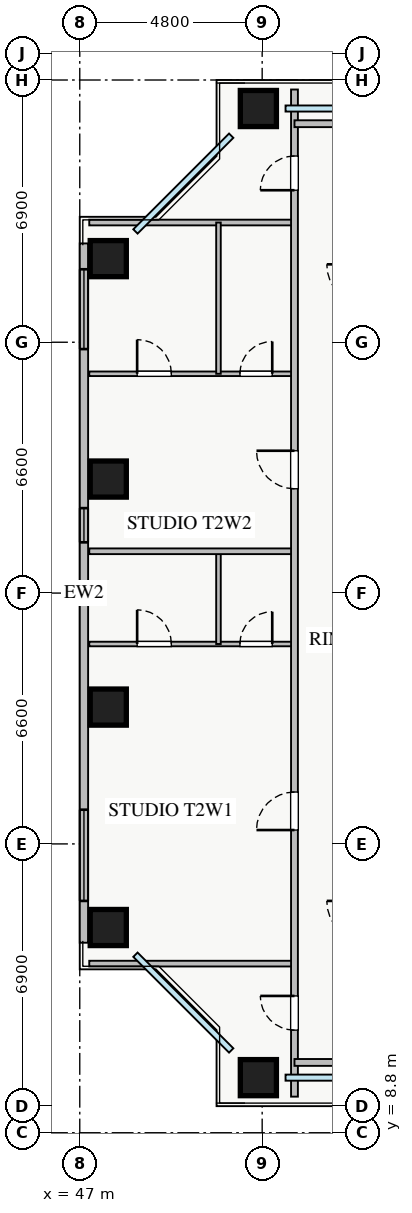
"""IFC4 building model, lengths in metres.
Left out: names, types, materials, properties, quantities, classifications, styles, units other than length and angle.
Written with IfcOpenShell. Run it as: python <this file> out.ifc"""

import sys

from ifc_helpers import new_model, si_unit, direction, frame, frame_2d, origin, origin_2d, place, context, subcontext, project, spatial, rectangle, extrude, source, transform, mapped, element, fill, save


model = new_model("IFC4")
c1 = context("Model", 3, precision=1e-05, world=origin(), true_north=direction((0.0, 1.0)))
c2 = subcontext(c1, "Body", "Model", "MODEL_VIEW")
j1 = project(units=[si_unit("LENGTHUNIT", "METRE"), si_unit("PLANEANGLEUNIT", "RADIAN")], contexts=[c1])
p1 = place(None, origin())
s1 = spatial("IfcSite", under=j1, at=p1, CompositionType="ELEMENT")
p2 = place(p1, origin())
s2 = spatial("IfcBuilding", under=s1, at=p2, CompositionType="ELEMENT")
p3 = place(p2, frame((0.0, 0.0, 39.25)))
s3 = spatial("IfcBuildingStorey", under=s2, at=p3, CompositionType="ELEMENT", Elevation=39.25)
m1 = source(origin(), c2, "Body", "SweptSolid", [
    extrude(rectangle(XDim=0.95, YDim=0.95, at=origin_2d()), origin(), (0.0, 0.0, 1.0), 3.25),
])
for number, where, z_axis, x_axis in (
    (1, (51.7, 10.25, 0.0), (0.0, 0.0, 1.0), (1.0, 0.0, 0.0)),
    (2, (51.7, 35.75, 0.0), (0.0, 0.0, 1.0), (1.0, 0.0, 0.0)),
    (3, (47.75, 14.2, 0.0), (0.0, 0.0, 1.0), (1.0, 0.0, 0.0)),
    (4, (47.75, 20.0, 0.0), (0.0, 0.0, 1.0), (1.0, 0.0, 0.0)),
    (5, (47.75, 26.0, 0.0), (0.0, 0.0, 1.0), (1.0, 0.0, 0.0)),
    (6, (47.75, 31.8, 0.0), (0.0, 0.0, 1.0), (1.0, 0.0, 0.0)),
):
    element("IfcColumn", number, at=place(p3, frame(where, z_axis=z_axis, x_axis=x_axis)), inside=s3, PredefinedType="COLUMN", context=c2, shape_type="MappedRepresentation", body=[
        mapped(m1, transform((0.0, 0.0, 0.0), x_axis=(1.0, 0.0, 0.0), y_axis=(0.0, 1.0, 0.0), z_axis=(0.0, 0.0, 1.0), scale=1.0)),
    ])
p4 = place(p3, frame((47.11, 13.8, 0.0), z_axis=(0.0, 0.0, 1.0), x_axis=(0.0, 1.0, 0.0)))
e7 = element("IfcWall", 7, at=p4, inside=s3, PredefinedType="STANDARD", context=c2, shape_type="SweptSolid", body=[
    extrude(rectangle(XDim=18.4, YDim=0.22, at=frame_2d((9.2, 0.0))), origin(), (0.0, 0.0, 1.0), 2.61),
])
p5 = place(p4, frame((1.1, 0.0, 0.9)))
e8 = element("IfcOpeningElement", 8, at=p5, cuts=e7, PredefinedType="OPENING", context=c2, shape_type="SweptSolid", body=[
    extrude(rectangle(XDim=2.4, YDim=1.48, at=frame_2d((1.2, 0.74))), frame((0.0, 0.12, 0.0), z_axis=(0.0, -1.0, 0.0), x_axis=(1.0, 0.0, 0.0)), (0.0, 0.0, 1.0), 0.24),
])
p6 = place(p4, frame((15.62, 0.0, 0.9)))
e9 = element("IfcOpeningElement", 9, at=p6, cuts=e7, PredefinedType="OPENING", context=c2, shape_type="SweptSolid", body=[
    extrude(rectangle(XDim=2.1, YDim=1.5, at=frame_2d((1.05, 0.75))), frame((0.0, 0.12, 0.0), z_axis=(0.0, -1.0, 0.0), x_axis=(1.0, 0.0, 0.0)), (0.0, 0.0, 1.0), 0.24),
])
p7 = place(p4, frame((10.535, 0.0, 0.9)))
e10 = element("IfcOpeningElement", 10, at=p7, cuts=e7, PredefinedType="OPENING", context=c2, shape_type="SweptSolid", body=[
    extrude(rectangle(XDim=0.9, YDim=1.2, at=frame_2d((0.45, 0.6))), frame((0.0, 0.12, 0.0), z_axis=(0.0, -1.0, 0.0), x_axis=(1.0, 0.0, 0.0)), (0.0, 0.0, 1.0), 0.24),
])
for number, where, z_axis, x_axis in (
    (11, (47.25, 32.75, 0.0), (0.0, 0.0, 1.0), (1.0, 0.0, 0.0)),
    (12, (47.25, 13.25, 0.0), (0.0, 0.0, 1.0), (1.0, 0.0, 0.0)),
):
    element("IfcWall", number, at=place(p3, frame(where, z_axis=z_axis, x_axis=x_axis)), inside=s3, PredefinedType="PARTITIONING", context=c2, shape_type="SweptSolid", body=[
        extrude(rectangle(XDim=5.4, YDim=0.15, at=frame_2d((2.7, 0.0))), origin(), (0.0, 0.0, 1.0), 3.07),
    ])
p8 = place(p3, frame((47.25, 21.66, 0.0), z_axis=(0.0, 0.0, 1.0), x_axis=(1.0, 0.0, 0.0)))
e13 = element("IfcWall", 13, at=p8, inside=s3, PredefinedType="PLUMBINGWALL", context=c2, shape_type="SweptSolid", body=[
    extrude(rectangle(XDim=5.4, YDim=0.12, at=frame_2d((2.7, 0.0))), origin(), (0.0, 0.0, 1.0), 3.07),
])
p9 = place(p8, frame((1.26, 0.0, 0.0)))
e14 = element("IfcOpeningElement", 14, at=p9, cuts=e13, PredefinedType="OPENING", context=c2, shape_type="SweptSolid", body=[
    extrude(rectangle(XDim=0.9, YDim=2.05, at=frame_2d((0.45, 1.025))), frame((0.0, 0.07, 0.0), z_axis=(0.0, -1.0, 0.0), x_axis=(1.0, 0.0, 0.0)), (0.0, 0.0, 1.0), 0.14),
])
p10 = place(p8, frame((3.965, 0.0, 0.0)))
e15 = element("IfcOpeningElement", 15, at=p10, cuts=e13, PredefinedType="OPENING", context=c2, shape_type="SweptSolid", body=[
    extrude(rectangle(XDim=0.85, YDim=2.05, at=frame_2d((0.425, 1.025))), frame((0.0, 0.07, 0.0), z_axis=(0.0, -1.0, 0.0), x_axis=(1.0, 0.0, 0.0)), (0.0, 0.0, 1.0), 0.14),
])
p11 = place(p3, frame((50.65, 21.66, 0.0), z_axis=(0.0, 0.0, 1.0), x_axis=(0.0, 1.0, 0.0)))
e16 = element("IfcWall", 16, at=p11, inside=s3, PredefinedType="PLUMBINGWALL", context=c2, shape_type="SweptSolid", body=[
    extrude(rectangle(XDim=2.44, YDim=0.12, at=frame_2d((1.22, 0.0))), origin(), (0.0, 0.0, 1.0), 3.07),
])
p12 = place(p3, frame((47.25, 28.77, 0.0), z_axis=(0.0, 0.0, 1.0), x_axis=(1.0, 0.0, 0.0)))
e17 = element("IfcWall", 17, at=p12, inside=s3, PredefinedType="PLUMBINGWALL", context=c2, shape_type="SweptSolid", body=[
    extrude(rectangle(XDim=5.4, YDim=0.12, at=frame_2d((2.7, 0.0))), origin(), (0.0, 0.0, 1.0), 3.07),
])
p13 = place(p12, frame((1.26, 0.0, 0.0)))
e18 = element("IfcOpeningElement", 18, at=p13, cuts=e17, PredefinedType="OPENING", context=c2, shape_type="SweptSolid", body=[
    extrude(rectangle(XDim=0.9, YDim=2.05, at=frame_2d((0.45, 1.025))), frame((0.0, 0.07, 0.0), z_axis=(0.0, -1.0, 0.0), x_axis=(1.0, 0.0, 0.0)), (0.0, 0.0, 1.0), 0.14),
])
p14 = place(p12, frame((3.965, 0.0, 0.0)))
e19 = element("IfcOpeningElement", 19, at=p14, cuts=e17, PredefinedType="OPENING", context=c2, shape_type="SweptSolid", body=[
    extrude(rectangle(XDim=0.85, YDim=2.05, at=frame_2d((0.425, 1.025))), frame((0.0, 0.07, 0.0), z_axis=(0.0, -1.0, 0.0), x_axis=(1.0, 0.0, 0.0)), (0.0, 0.0, 1.0), 0.14),
])
p15 = place(p3, frame((50.65, 28.77, 0.0), z_axis=(0.0, 0.0, 1.0), x_axis=(0.0, 1.0, 0.0)))
e20 = element("IfcWall", 20, at=p15, inside=s3, PredefinedType="PLUMBINGWALL", context=c2, shape_type="SweptSolid", body=[
    extrude(rectangle(XDim=3.98, YDim=0.12, at=frame_2d((1.99, 0.0))), origin(), (0.0, 0.0, 1.0), 3.07),
])
p16 = place(p3, frame((47.25, 24.1, 0.0), z_axis=(0.0, 0.0, 1.0), x_axis=(1.0, 0.0, 0.0)))
e21 = element("IfcWall", 21, at=p16, inside=s3, PredefinedType="PARTITIONING", context=c2, shape_type="SweptSolid", body=[
    extrude(rectangle(XDim=5.4, YDim=0.15, at=frame_2d((2.7, 0.0))), origin(), (0.0, 0.0, 1.0), 3.07),
])
p17 = place(p3, frame((52.65, 9.75, 0.0), z_axis=(0.0, 0.0, 1.0), x_axis=(0.0, 1.0, 0.0)))
e22 = element("IfcWall", 22, at=p17, inside=s3, PredefinedType="PARTITIONING", context=c2, shape_type="SweptSolid", body=[
    extrude(rectangle(XDim=26.5, YDim=0.18, at=frame_2d((13.25, 0.0))), origin(), (0.0, 0.0, 1.0), 3.07),
])
p18 = place(p17, frame((23.85, 0.0, 0.0)))
e23 = element("IfcOpeningElement", 23, at=p18, cuts=e22, PredefinedType="OPENING", context=c2, shape_type="SweptSolid", body=[
    extrude(rectangle(XDim=0.9, YDim=2.05, at=frame_2d((0.45, 1.025))), frame((0.0, 0.1, 0.0), z_axis=(0.0, -1.0, 0.0), x_axis=(1.0, 0.0, 0.0)), (0.0, 0.0, 1.0), 0.2),
])
p19 = place(p17, frame((1.75, 0.0, 0.0)))
e24 = element("IfcOpeningElement", 24, at=p19, cuts=e22, PredefinedType="OPENING", context=c2, shape_type="SweptSolid", body=[
    extrude(rectangle(XDim=0.9, YDim=2.05, at=frame_2d((0.45, 1.025))), frame((0.0, 0.1, 0.0), z_axis=(0.0, -1.0, 0.0), x_axis=(1.0, 0.0, 0.0)), (0.0, 0.0, 1.0), 0.2),
])
p20 = place(p17, frame((7.015, 0.0, 0.0)))
e25 = element("IfcOpeningElement", 25, at=p20, cuts=e22, PredefinedType="OPENING", context=c2, shape_type="SweptSolid", body=[
    extrude(rectangle(XDim=1.0, YDim=2.05, at=frame_2d((0.5, 1.025))), frame((0.0, 0.1, 0.0), z_axis=(0.0, -1.0, 0.0), x_axis=(1.0, 0.0, 0.0)), (0.0, 0.0, 1.0), 0.2),
])
p21 = place(p17, frame((15.995, 0.0, 0.0)))
e26 = element("IfcOpeningElement", 26, at=p21, cuts=e22, PredefinedType="OPENING", context=c2, shape_type="SweptSolid", body=[
    extrude(rectangle(XDim=1.0, YDim=2.05, at=frame_2d((0.5, 1.025))), frame((0.0, 0.1, 0.0), z_axis=(0.0, -1.0, 0.0), x_axis=(1.0, 0.0, 0.0)), (0.0, 0.0, 1.0), 0.2),
])
p22 = place(p3, frame((52.65, 35.35, 0.0), z_axis=(0.0, 0.0, 1.0), x_axis=(1.0, 0.0, 0.0)))
e27 = element("IfcWall", 27, at=p22, inside=s3, PredefinedType="PARTITIONING", context=c2, shape_type="SweptSolid", body=[
    extrude(rectangle(XDim=17.0, YDim=0.18, at=frame_2d((8.5, 0.0))), origin(), (0.0, 0.0, 1.0), 3.07),
])
p23 = place(p22, frame((3.825, 0.0, 0.0)))
e28 = element("IfcOpeningElement", 28, at=p23, cuts=e27, PredefinedType="OPENING", context=c2, shape_type="SweptSolid", body=[
    extrude(rectangle(XDim=0.9, YDim=2.05, at=frame_2d((0.45, 1.025))), frame((0.0, 0.1, 0.0), z_axis=(0.0, -1.0, 0.0), x_axis=(1.0, 0.0, 0.0)), (0.0, 0.0, 1.0), 0.2),
])
p24 = place(p22, frame((12.325, 0.0, 0.0)))
e29 = element("IfcOpeningElement", 29, at=p24, cuts=e27, PredefinedType="OPENING", context=c2, shape_type="SweptSolid", body=[
    extrude(rectangle(XDim=0.9, YDim=2.05, at=frame_2d((0.45, 1.025))), frame((0.0, 0.1, 0.0), z_axis=(0.0, -1.0, 0.0), x_axis=(1.0, 0.0, 0.0)), (0.0, 0.0, 1.0), 0.2),
])
p25 = place(p3, frame((52.65, 10.65, 0.0), z_axis=(0.0, 0.0, 1.0), x_axis=(1.0, 0.0, 0.0)))
e30 = element("IfcWall", 30, at=p25, inside=s3, PredefinedType="PARTITIONING", context=c2, shape_type="SweptSolid", body=[
    extrude(rectangle(XDim=17.0, YDim=0.18, at=frame_2d((8.5, 0.0))), origin(), (0.0, 0.0, 1.0), 3.07),
])
p26 = place(p25, frame((4.375, 0.0, 0.0)))
e31 = element("IfcOpeningElement", 31, at=p26, cuts=e30, PredefinedType="OPENING", context=c2, shape_type="SweptSolid", body=[
    extrude(rectangle(XDim=0.9, YDim=2.05, at=frame_2d((0.45, 1.025))), frame((0.0, 0.1, 0.0), z_axis=(0.0, -1.0, 0.0), x_axis=(1.0, 0.0, 0.0)), (0.0, 0.0, 1.0), 0.2),
])
p27 = place(p25, frame((12.875, 0.0, 0.0)))
e32 = element("IfcOpeningElement", 32, at=p27, cuts=e30, PredefinedType="OPENING", context=c2, shape_type="SweptSolid", body=[
    extrude(rectangle(XDim=0.9, YDim=2.05, at=frame_2d((0.45, 1.025))), frame((0.0, 0.1, 0.0), z_axis=(0.0, -1.0, 0.0), x_axis=(1.0, 0.0, 0.0)), (0.0, 0.0, 1.0), 0.2),
])
m2 = source(origin(), c2, "Body", "SweptSolid", [
    extrude(rectangle(XDim=2.4, YDim=1.48, at=frame_2d((1.2, 0.74))), frame((0.0, 0.03, 0.0), z_axis=(0.0, -1.0, 0.0), x_axis=(1.0, 0.0, 0.0)), (0.0, 0.0, 1.0), 0.06),
])
p28 = place(p5, origin())
e33 = element("IfcWindow", 33, at=p28, inside=s3, PartitioningType="TRIPLE_PANEL_VERTICAL", PredefinedType="WINDOW", context=c2, shape_type="MappedRepresentation", body=[
    mapped(m2, transform((0.0, 0.0, 0.0), x_axis=(1.0, 0.0, 0.0), y_axis=(0.0, 1.0, 0.0), z_axis=(0.0, 0.0, 1.0), scale=1.0)),
])
fill(e8, e33)
m3 = source(origin(), c2, "Body", "SweptSolid", [
    extrude(rectangle(XDim=2.1, YDim=1.5, at=frame_2d((1.05, 0.75))), frame((0.0, 0.03, 0.0), z_axis=(0.0, -1.0, 0.0), x_axis=(1.0, 0.0, 0.0)), (0.0, 0.0, 1.0), 0.06),
])
p29 = place(p6, origin())
e34 = element("IfcWindow", 34, at=p29, inside=s3, PartitioningType="TRIPLE_PANEL_VERTICAL", PredefinedType="WINDOW", context=c2, shape_type="MappedRepresentation", body=[
    mapped(m3, transform((0.0, 0.0, 0.0), x_axis=(1.0, 0.0, 0.0), y_axis=(0.0, 1.0, 0.0), z_axis=(0.0, 0.0, 1.0), scale=1.0)),
])
fill(e9, e34)
m4 = source(origin(), c2, "Body", "SweptSolid", [
    extrude(rectangle(XDim=0.9, YDim=2.05, at=frame_2d((0.45, 1.025))), frame((0.0, 0.025, 0.0), z_axis=(0.0, -1.0, 0.0), x_axis=(1.0, 0.0, 0.0)), (0.0, 0.0, 1.0), 0.05),
])
p30 = place(p9, origin())
e35 = element("IfcDoor", 35, at=p30, inside=s3, OperationType="SINGLE_SWING_LEFT", PredefinedType="DOOR", context=c2, shape_type="MappedRepresentation", body=[
    mapped(m4, transform((0.0, 0.0, 0.0), x_axis=(1.0, 0.0, 0.0), y_axis=(0.0, 1.0, 0.0), z_axis=(0.0, 0.0, 1.0), scale=1.0)),
])
fill(e14, e35)
m5 = source(origin(), c2, "Body", "SweptSolid", [
    extrude(rectangle(XDim=0.85, YDim=2.05, at=frame_2d((0.425, 1.025))), frame((0.0, 0.025, 0.0), z_axis=(0.0, -1.0, 0.0), x_axis=(1.0, 0.0, 0.0)), (0.0, 0.0, 1.0), 0.05),
])
p31 = place(p10, origin())
e36 = element("IfcDoor", 36, at=p31, inside=s3, OperationType="SINGLE_SWING_RIGHT", PredefinedType="DOOR", context=c2, shape_type="MappedRepresentation", body=[
    mapped(m5, transform((0.0, 0.0, 0.0), x_axis=(1.0, 0.0, 0.0), y_axis=(0.0, 1.0, 0.0), z_axis=(0.0, 0.0, 1.0), scale=1.0)),
])
fill(e15, e36)
p32 = place(p13, origin())
e37 = element("IfcDoor", 37, at=p32, inside=s3, OperationType="SINGLE_SWING_LEFT", PredefinedType="DOOR", context=c2, shape_type="MappedRepresentation", body=[
    mapped(m4, transform((0.0, 0.0, 0.0), x_axis=(1.0, 0.0, 0.0), y_axis=(0.0, 1.0, 0.0), z_axis=(0.0, 0.0, 1.0), scale=1.0)),
])
fill(e18, e37)
p33 = place(p14, origin())
e38 = element("IfcDoor", 38, at=p33, inside=s3, OperationType="SINGLE_SWING_RIGHT", PredefinedType="DOOR", context=c2, shape_type="MappedRepresentation", body=[
    mapped(m5, transform((0.0, 0.0, 0.0), x_axis=(1.0, 0.0, 0.0), y_axis=(0.0, 1.0, 0.0), z_axis=(0.0, 0.0, 1.0), scale=1.0)),
])
fill(e19, e38)
p34 = place(p18, origin())
e39 = element("IfcDoor", 39, at=p34, inside=s3, OperationType="SINGLE_SWING_LEFT", PredefinedType="DOOR", context=c2, shape_type="MappedRepresentation", body=[
    mapped(m4, transform((0.0, 0.0, 0.0), x_axis=(1.0, 0.0, 0.0), y_axis=(0.0, 1.0, 0.0), z_axis=(0.0, 0.0, 1.0), scale=1.0)),
])
fill(e23, e39)
p35 = place(p19, origin())
e40 = element("IfcDoor", 40, at=p35, inside=s3, OperationType="SINGLE_SWING_RIGHT", PredefinedType="DOOR", context=c2, shape_type="MappedRepresentation", body=[
    mapped(m4, transform((0.0, 0.0, 0.0), x_axis=(1.0, 0.0, 0.0), y_axis=(0.0, 1.0, 0.0), z_axis=(0.0, 0.0, 1.0), scale=1.0)),
])
fill(e24, e40)
m6 = source(origin(), c2, "Body", "SweptSolid", [
    extrude(rectangle(XDim=1.0, YDim=2.05, at=frame_2d((0.5, 1.025))), frame((0.0, 0.025, 0.0), z_axis=(0.0, -1.0, 0.0), x_axis=(1.0, 0.0, 0.0)), (0.0, 0.0, 1.0), 0.05),
])
p36 = place(p20, origin())
e41 = element("IfcDoor", 41, at=p36, inside=s3, OperationType="SINGLE_SWING_LEFT", PredefinedType="DOOR", context=c2, shape_type="MappedRepresentation", body=[
    mapped(m6, transform((0.0, 0.0, 0.0), x_axis=(1.0, 0.0, 0.0), y_axis=(0.0, 1.0, 0.0), z_axis=(0.0, 0.0, 1.0), scale=1.0)),
])
fill(e25, e41)
p37 = place(p21, origin())
e42 = element("IfcDoor", 42, at=p37, inside=s3, OperationType="SINGLE_SWING_RIGHT", PredefinedType="DOOR", context=c2, shape_type="MappedRepresentation", body=[
    mapped(m6, transform((0.0, 0.0, 0.0), x_axis=(1.0, 0.0, 0.0), y_axis=(0.0, 1.0, 0.0), z_axis=(0.0, 0.0, 1.0), scale=1.0)),
])
fill(e26, e42)
m7 = source(origin(), c2, "Body", "SweptSolid", [
    extrude(rectangle(XDim=0.9, YDim=1.2, at=frame_2d((0.45, 0.6))), frame((0.0, 0.03, 0.0), z_axis=(0.0, -1.0, 0.0), x_axis=(1.0, 0.0, 0.0)), (0.0, 0.0, 1.0), 0.06),
])
p38 = place(p7, origin())
e43 = element("IfcWindow", 43, at=p38, inside=s3, PartitioningType="SINGLE_PANEL", PredefinedType="WINDOW", context=c2, shape_type="MappedRepresentation", body=[
    mapped(m7, transform((0.0, 0.0, 0.0), x_axis=(1.0, 0.0, 0.0), y_axis=(0.0, 1.0, 0.0), z_axis=(0.0, 0.0, 1.0), scale=1.0)),
])
fill(e10, e43)
save(model, sys.argv[1])
